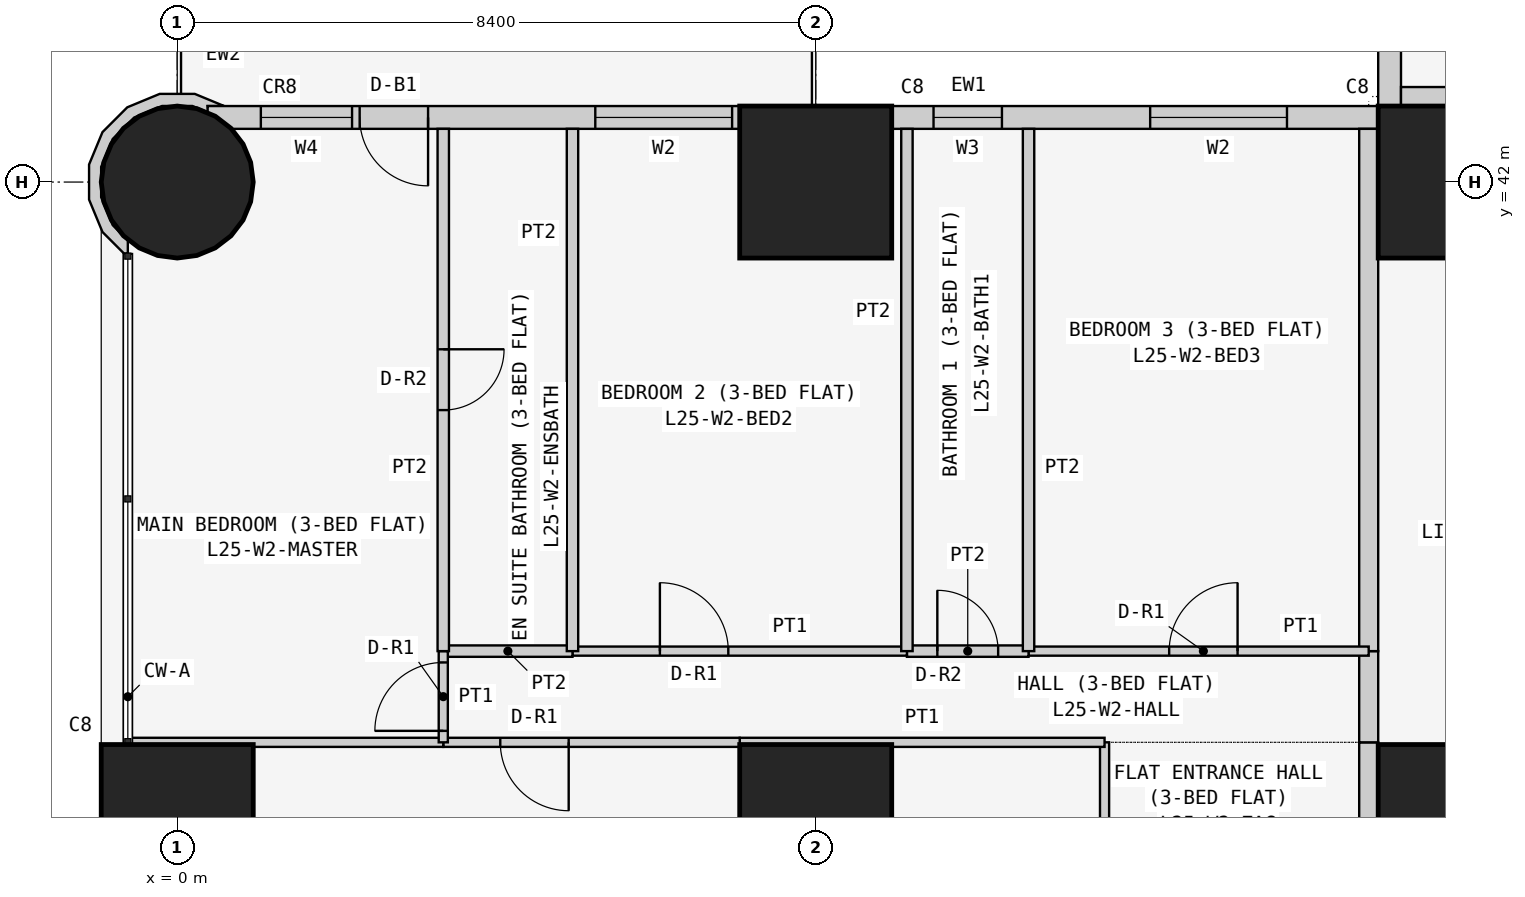
"""IFC4 building model, lengths in metres.
Left out: names, types, materials, properties, quantities, classifications, styles, units other than length and angle.
Written with IfcOpenShell. Run it as: python <this file> out.ifc"""

import sys

from ifc_helpers import new_model, si_unit, direction, frame, frame_2d, origin, origin_2d, place, context, subcontext, project, spatial, polyline, rectangle, circle, outline, extrude, element, fill, save


model = new_model("IFC4")
c1 = context("Model", 3, precision=1e-05, world=origin(), true_north=direction((0.0, 1.0)))
c2 = subcontext(c1, "Body", "Model", "MODEL_VIEW")
j1 = project(units=[si_unit("LENGTHUNIT", "METRE"), si_unit("PLANEANGLEUNIT", "RADIAN")], contexts=[c1])
p1 = place(None, origin())
s1 = spatial("IfcSite", under=j1, at=p1, CompositionType="ELEMENT")
p2 = place(p1, origin())
s2 = spatial("IfcBuilding", under=s1, at=p2, CompositionType="ELEMENT")
p3 = place(p2, frame((0.0, 0.0, 99.3)))
s3 = spatial("IfcBuildingStorey", under=s2, at=p3, CompositionType="ELEMENT", Elevation=99.3)
p4 = place(p3, frame((0.0, 33.6, 0.0), z_axis=(0.0, 0.0, 1.0), x_axis=(1.0, 0.0, 0.0)))
e1 = element("IfcColumn", 1, at=p4, inside=s3, PredefinedType="COLUMN", context=c2, shape_type="SweptSolid", body=[
    extrude(rectangle(XDim=2.0, YDim=2.0, at=origin_2d()), origin(), (0.0, 0.0, 1.0), 3.6),
])
p5 = place(p3, frame((0.0, 42.0, 0.0), z_axis=(0.0, 0.0, 1.0), x_axis=(1.0, 0.0, 0.0)))
e2 = element("IfcColumn", 2, at=p5, inside=s3, PredefinedType="COLUMN", context=c2, shape_type="SweptSolid", body=[
    extrude(circle(Radius=1.0, at=origin_2d()), origin(), (0.0, 0.0, 1.0), 3.6),
])
for number, where, z_axis, x_axis in (
    (3, (8.4, 33.6, 0.0), (0.0, 0.0, 1.0), (1.0, 0.0, 0.0)),
    (4, (8.4, 42.0, 0.0), (0.0, 0.0, 1.0), (1.0, 0.0, 0.0)),
    (5, (16.8, 33.6, 0.0), (0.0, 0.0, 1.0), (1.0, 0.0, 0.0)),
    (6, (16.8, 42.0, 0.0), (0.0, 0.0, 1.0), (1.0, 0.0, 0.0)),
):
    element("IfcColumn", number, at=place(p3, frame(where, z_axis=z_axis, x_axis=x_axis)), inside=s3, PredefinedType="COLUMN", context=c2, shape_type="SweptSolid", body=[
        extrude(rectangle(XDim=2.0, YDim=2.0, at=origin_2d()), origin(), (0.0, 0.0, 1.0), 3.6),
    ])
p6 = place(p3, frame((15.8, 42.85, 0.0), z_axis=(0.0, 0.0, 1.0), x_axis=(-1.0, 0.0, 0.0)))
e7 = element("IfcWall", 7, at=p6, inside=s3, PredefinedType="SOLIDWALL", context=c2, shape_type="SweptSolid", body=[
    extrude(rectangle(XDim=15.4, YDim=0.3, at=frame_2d((7.7, 0.0))), origin(), (0.0, 0.0, 1.0), 3.35),
])
p7 = place(p6, frame((1.2, 0.0, 0.9)))
e8 = element("IfcOpeningElement", 8, at=p7, cuts=e7, PredefinedType="OPENING", context=c2, shape_type="SweptSolid", body=[
    extrude(rectangle(XDim=1.8, YDim=1.5, at=frame_2d((0.9, 0.75))), frame((0.0, 0.16, 0.0), z_axis=(0.0, -1.0, 0.0), x_axis=(1.0, 0.0, 0.0)), (0.0, 0.0, 1.0), 0.32),
])
p8 = place(p6, frame((4.95, 0.0, 1.5)))
e9 = element("IfcOpeningElement", 9, at=p8, cuts=e7, PredefinedType="OPENING", context=c2, shape_type="SweptSolid", body=[
    extrude(rectangle(XDim=0.9, YDim=0.7, at=frame_2d((0.45, 0.35))), frame((0.0, 0.16, 0.0), z_axis=(0.0, -1.0, 0.0), x_axis=(1.0, 0.0, 0.0)), (0.0, 0.0, 1.0), 0.32),
])
p9 = place(p6, frame((8.5, 0.0, 0.9)))
e10 = element("IfcOpeningElement", 10, at=p9, cuts=e7, PredefinedType="OPENING", context=c2, shape_type="SweptSolid", body=[
    extrude(rectangle(XDim=1.8, YDim=1.5, at=frame_2d((0.9, 0.75))), frame((0.0, 0.16, 0.0), z_axis=(0.0, -1.0, 0.0), x_axis=(1.0, 0.0, 0.0)), (0.0, 0.0, 1.0), 0.32),
])
p10 = place(p6, frame((12.5, 0.0, 0.0)))
e11 = element("IfcOpeningElement", 11, at=p10, cuts=e7, PredefinedType="OPENING", context=c2, shape_type="SweptSolid", body=[
    extrude(rectangle(XDim=0.9, YDim=2.4, at=frame_2d((0.45, 1.2))), frame((0.0, 0.16, 0.0), z_axis=(0.0, -1.0, 0.0), x_axis=(1.0, 0.0, 0.0)), (0.0, 0.0, 1.0), 0.32),
])
p11 = place(p6, frame((13.5, 0.0, 0.9)))
e12 = element("IfcOpeningElement", 12, at=p11, cuts=e7, PredefinedType="OPENING", context=c2, shape_type="SweptSolid", body=[
    extrude(rectangle(XDim=1.2, YDim=1.5, at=frame_2d((0.6, 0.75))), frame((0.0, 0.16, 0.0), z_axis=(0.0, -1.0, 0.0), x_axis=(1.0, 0.0, 0.0)), (0.0, 0.0, 1.0), 0.32),
])
p12 = place(p3, frame((15.95, 58.4, 0.0), z_axis=(0.0, 0.0, 1.0), x_axis=(0.0, -1.0, 0.0)))
e13 = element("IfcWall", 13, at=p12, inside=s3, PredefinedType="SOLIDWALL", context=c2, shape_type="SweptSolid", body=[
    extrude(rectangle(XDim=15.7, YDim=0.3, at=frame_2d((7.85, 0.0))), origin(), (0.0, 0.0, 1.0), 3.35),
])
p13 = place(p12, frame((12.4, 0.0, 0.9)))
e14 = element("IfcOpeningElement", 14, at=p13, cuts=e13, PredefinedType="OPENING", context=c2, shape_type="SweptSolid", body=[
    extrude(rectangle(XDim=1.8, YDim=1.5, at=frame_2d((0.9, 0.75))), frame((0.0, 0.16, 0.0), z_axis=(0.0, -1.0, 0.0), x_axis=(1.0, 0.0, 0.0)), (0.0, 0.0, 1.0), 0.32),
])
p14 = place(p12, frame((9.55, 0.0, 1.5)))
e15 = element("IfcOpeningElement", 15, at=p14, cuts=e13, PredefinedType="OPENING", context=c2, shape_type="SweptSolid", body=[
    extrude(rectangle(XDim=0.9, YDim=0.7, at=frame_2d((0.45, 0.35))), frame((0.0, 0.16, 0.0), z_axis=(0.0, -1.0, 0.0), x_axis=(1.0, 0.0, 0.0)), (0.0, 0.0, 1.0), 0.32),
])
p15 = place(p12, frame((5.1, 0.0, 0.9)))
e16 = element("IfcOpeningElement", 16, at=p15, cuts=e13, PredefinedType="OPENING", context=c2, shape_type="SweptSolid", body=[
    extrude(rectangle(XDim=1.8, YDim=1.5, at=frame_2d((0.9, 0.75))), frame((0.0, 0.16, 0.0), z_axis=(0.0, -1.0, 0.0), x_axis=(1.0, 0.0, 0.0)), (0.0, 0.0, 1.0), 0.32),
])
p16 = place(p12, frame((2.0, 0.0, 0.0)))
e17 = element("IfcOpeningElement", 17, at=p16, cuts=e13, PredefinedType="OPENING", context=c2, shape_type="SweptSolid", body=[
    extrude(rectangle(XDim=0.9, YDim=2.4, at=frame_2d((0.45, 1.2))), frame((0.0, 0.16, 0.0), z_axis=(0.0, -1.0, 0.0), x_axis=(1.0, 0.0, 0.0)), (0.0, 0.0, 1.0), 0.32),
])
p17 = place(p12, frame((0.7, 0.0, 0.9)))
e18 = element("IfcOpeningElement", 18, at=p17, cuts=e13, PredefinedType="OPENING", context=c2, shape_type="SweptSolid", body=[
    extrude(rectangle(XDim=1.2, YDim=1.5, at=frame_2d((0.6, 0.75))), frame((0.0, 0.16, 0.0), z_axis=(0.0, -1.0, 0.0), x_axis=(1.0, 0.0, 0.0)), (0.0, 0.0, 1.0), 0.32),
])
p18 = place(p3, frame((0.567, 42.919, 0.0), z_axis=(0.0, 0.0, 1.0), x_axis=(-0.831199417842, 0.555974394895, 0.0)))
e19 = element("IfcWall", 19, at=p18, inside=s3, PredefinedType="SOLIDWALL", context=c2, shape_type="SweptSolid", body=[
    extrude(outline(polyline([(0.004, -0.095), (0.413, -0.013), (0.797, 0.243), (1.053, 0.627), (1.143, 1.08), (1.053, 1.532), (0.796, 1.916), (0.412, 2.172), (0.017, 2.251), (-0.023, 2.224), (0.075, 2.077), (0.351, 2.022), (0.682, 1.801), (0.903, 1.47), (0.981, 1.08), (0.903, 0.689), (0.682, 0.358), (0.351, 0.137), (0.126, 0.092), (0.184, 0.026), (0.004, -0.095)])), origin(), (0.0, 0.0, 1.0), 3.35),
])
p19 = place(p3, frame((16.1, 43.125, 0.0), z_axis=(0.0, 0.0, 1.0), x_axis=(1.0, 0.0, 0.0)))
e20 = element("IfcWall", 20, at=p19, inside=s3, PredefinedType="PARTITIONING", context=c2, shape_type="SweptSolid", body=[
    extrude(rectangle(XDim=6.871, YDim=0.25, at=frame_2d((3.436, 0.0))), origin(), (0.0, 0.0, 1.0), 3.35),
])
p20 = place(p3, frame((15.675, 29.4, 0.0), z_axis=(0.0, 0.0, 1.0), x_axis=(0.0, 1.0, 0.0)))
e21 = element("IfcWall", 21, at=p20, inside=s3, PredefinedType="PARTITIONING", context=c2, shape_type="SweptSolid", body=[
    extrude(rectangle(XDim=5.229, YDim=0.25, at=frame_2d((2.615, 0.0))), origin(), (0.0, 0.0, 1.0), 3.35),
])
p21 = place(p20, frame((2.0, 0.0, 0.0)))
e22 = element("IfcOpeningElement", 22, at=p21, cuts=e21, PredefinedType="OPENING", context=c2, shape_type="SweptSolid", body=[
    extrude(rectangle(XDim=1.0, YDim=2.1, at=frame_2d((0.5, 1.05))), frame((0.0, 0.135, 0.0), z_axis=(0.0, -1.0, 0.0), x_axis=(1.0, 0.0, 0.0)), (0.0, 0.0, 1.0), 0.27),
])
p22 = place(p3, frame((15.675, 34.629, 0.0), z_axis=(0.0, 0.0, 1.0), x_axis=(0.0, 1.0, 0.0)))
e23 = element("IfcWall", 23, at=p22, inside=s3, PredefinedType="PARTITIONING", context=c2, shape_type="SweptSolid", body=[
    extrude(rectangle(XDim=1.2, YDim=0.25, at=frame_2d((0.6, 0.0))), origin(), (0.0, 0.0, 1.0), 3.35),
])
p23 = place(p3, frame((15.675, 35.829, 0.0), z_axis=(0.0, 0.0, 1.0), x_axis=(0.0, 1.0, 0.0)))
e24 = element("IfcWall", 24, at=p23, inside=s3, PredefinedType="PARTITIONING", context=c2, shape_type="SweptSolid", body=[
    extrude(rectangle(XDim=6.871, YDim=0.25, at=frame_2d((3.436, 0.0))), origin(), (0.0, 0.0, 1.0), 3.35),
])
p24 = place(p3, frame((12.2, 29.4, 0.0), z_axis=(0.0, 0.0, 1.0), x_axis=(0.0, 1.0, 0.0)))
e25 = element("IfcWall", 25, at=p24, inside=s3, PredefinedType="PARTITIONING", context=c2, shape_type="SweptSolid", body=[
    extrude(rectangle(XDim=5.229, YDim=0.12, at=frame_2d((2.615, 0.0))), origin(), (0.0, 0.0, 1.0), 3.35),
])
p25 = place(p24, frame((1.05, 0.0, 0.0)))
e26 = element("IfcOpeningElement", 26, at=p25, cuts=e25, PredefinedType="OPENING", context=c2, shape_type="SweptSolid", body=[
    extrude(rectangle(XDim=0.9, YDim=2.1, at=frame_2d((0.45, 1.05))), frame((0.0, 0.07, 0.0), z_axis=(0.0, -1.0, 0.0), x_axis=(1.0, 0.0, 0.0)), (0.0, 0.0, 1.0), 0.14),
])
p26 = place(p3, frame((7.4, 34.629, 0.0), z_axis=(0.0, 0.0, 1.0), x_axis=(1.0, 0.0, 0.0)))
e27 = element("IfcWall", 27, at=p26, inside=s3, PredefinedType="PARTITIONING", context=c2, shape_type="SweptSolid", body=[
    extrude(rectangle(XDim=4.8, YDim=0.12, at=frame_2d((2.4, 0.0))), origin(), (0.0, 0.0, 1.0), 3.35),
])
p27 = place(p3, frame((3.5, 34.629, 0.0), z_axis=(0.0, 0.0, 1.0), x_axis=(1.0, 0.0, 0.0)))
e28 = element("IfcWall", 28, at=p27, inside=s3, PredefinedType="PARTITIONING", context=c2, shape_type="SweptSolid", body=[
    extrude(rectangle(XDim=3.9, YDim=0.12, at=frame_2d((1.95, 0.0))), origin(), (0.0, 0.0, 1.0), 3.35),
])
p28 = place(p27, frame((0.75, 0.0, 0.0)))
e29 = element("IfcOpeningElement", 29, at=p28, cuts=e28, PredefinedType="OPENING", context=c2, shape_type="SweptSolid", body=[
    extrude(rectangle(XDim=0.9, YDim=2.1, at=frame_2d((0.45, 1.05))), frame((0.0, 0.07, 0.0), z_axis=(0.0, -1.0, 0.0), x_axis=(1.0, 0.0, 0.0)), (0.0, 0.0, 1.0), 0.14),
])
p29 = place(p3, frame((-0.65, 34.629, 0.0), z_axis=(0.0, 0.0, 1.0), x_axis=(1.0, 0.0, 0.0)))
e30 = element("IfcWall", 30, at=p29, inside=s3, PredefinedType="PARTITIONING", context=c2, shape_type="SweptSolid", body=[
    extrude(rectangle(XDim=4.15, YDim=0.12, at=frame_2d((2.075, 0.0))), origin(), (0.0, 0.0, 1.0), 3.35),
])
p30 = place(p3, frame((11.2, 35.829, 0.0), z_axis=(0.0, 0.0, 1.0), x_axis=(1.0, 0.0, 0.0)))
e31 = element("IfcWall", 31, at=p30, inside=s3, PredefinedType="PARTITIONING", context=c2, shape_type="SweptSolid", body=[
    extrude(rectangle(XDim=4.475, YDim=0.12, at=frame_2d((2.238, 0.0))), origin(), (0.0, 0.0, 1.0), 3.35),
])
p31 = place(p30, frame((1.85, 0.0, 0.0)))
e32 = element("IfcOpeningElement", 32, at=p31, cuts=e31, PredefinedType="OPENING", context=c2, shape_type="SweptSolid", body=[
    extrude(rectangle(XDim=0.9, YDim=2.1, at=frame_2d((0.45, 1.05))), frame((0.0, 0.07, 0.0), z_axis=(0.0, -1.0, 0.0), x_axis=(1.0, 0.0, 0.0)), (0.0, 0.0, 1.0), 0.14),
])
p32 = place(p3, frame((9.6, 35.829, 0.0), z_axis=(0.0, 0.0, 1.0), x_axis=(1.0, 0.0, 0.0)))
e33 = element("IfcWall", 33, at=p32, inside=s3, PredefinedType="PARTITIONING", context=c2, shape_type="SweptSolid", body=[
    extrude(rectangle(XDim=1.6, YDim=0.15, at=frame_2d((0.8, 0.0))), origin(), (0.0, 0.0, 1.0), 3.35),
])
p33 = place(p32, frame((0.4, 0.0, 0.0)))
e34 = element("IfcOpeningElement", 34, at=p33, cuts=e33, PredefinedType="OPENING", context=c2, shape_type="SweptSolid", body=[
    extrude(rectangle(XDim=0.8, YDim=2.1, at=frame_2d((0.4, 1.05))), frame((0.0, 0.085, 0.0), z_axis=(0.0, -1.0, 0.0), x_axis=(1.0, 0.0, 0.0)), (0.0, 0.0, 1.0), 0.17),
])
p34 = place(p3, frame((5.2, 35.829, 0.0), z_axis=(0.0, 0.0, 1.0), x_axis=(1.0, 0.0, 0.0)))
e35 = element("IfcWall", 35, at=p34, inside=s3, PredefinedType="PARTITIONING", context=c2, shape_type="SweptSolid", body=[
    extrude(rectangle(XDim=4.4, YDim=0.12, at=frame_2d((2.2, 0.0))), origin(), (0.0, 0.0, 1.0), 3.35),
])
p35 = place(p34, frame((1.15, 0.0, 0.0)))
e36 = element("IfcOpeningElement", 36, at=p35, cuts=e35, PredefinedType="OPENING", context=c2, shape_type="SweptSolid", body=[
    extrude(rectangle(XDim=0.9, YDim=2.1, at=frame_2d((0.45, 1.05))), frame((0.0, 0.07, 0.0), z_axis=(0.0, -1.0, 0.0), x_axis=(1.0, 0.0, 0.0)), (0.0, 0.0, 1.0), 0.14),
])
p36 = place(p3, frame((3.5, 35.829, 0.0), z_axis=(0.0, 0.0, 1.0), x_axis=(1.0, 0.0, 0.0)))
e37 = element("IfcWall", 37, at=p36, inside=s3, PredefinedType="PARTITIONING", context=c2, shape_type="SweptSolid", body=[
    extrude(rectangle(XDim=1.7, YDim=0.15, at=frame_2d((0.85, 0.0))), origin(), (0.0, 0.0, 1.0), 3.35),
])
p37 = place(p3, frame((3.5, 34.629, 0.0), z_axis=(0.0, 0.0, 1.0), x_axis=(0.0, 1.0, 0.0)))
e38 = element("IfcWall", 38, at=p37, inside=s3, PredefinedType="PARTITIONING", context=c2, shape_type="SweptSolid", body=[
    extrude(rectangle(XDim=1.2, YDim=0.12, at=frame_2d((0.6, 0.0))), origin(), (0.0, 0.0, 1.0), 3.35),
])
p38 = place(p37, frame((0.151, 0.0, 0.0)))
e39 = element("IfcOpeningElement", 39, at=p38, cuts=e38, PredefinedType="OPENING", context=c2, shape_type="SweptSolid", body=[
    extrude(rectangle(XDim=0.9, YDim=2.1, at=frame_2d((0.45, 1.05))), frame((0.0, 0.07, 0.0), z_axis=(0.0, -1.0, 0.0), x_axis=(1.0, 0.0, 0.0)), (0.0, 0.0, 1.0), 0.14),
])
for number, where, z_axis, x_axis in (
    (40, (11.2, 35.829, 0.0), (0.0, 0.0, 1.0), (0.0, 1.0, 0.0)),
    (41, (9.6, 35.829, 0.0), (0.0, 0.0, 1.0), (0.0, 1.0, 0.0)),
    (42, (5.2, 35.829, 0.0), (0.0, 0.0, 1.0), (0.0, 1.0, 0.0)),
):
    element("IfcWall", number, at=place(p3, frame(where, z_axis=z_axis, x_axis=x_axis)), inside=s3, PredefinedType="PARTITIONING", context=c2, shape_type="SweptSolid", body=[
        extrude(rectangle(XDim=6.871, YDim=0.15, at=frame_2d((3.436, 0.0))), origin(), (0.0, 0.0, 1.0), 3.35),
    ])
p39 = place(p3, frame((3.5, 35.829, 0.0), z_axis=(0.0, 0.0, 1.0), x_axis=(0.0, 1.0, 0.0)))
e43 = element("IfcWall", 43, at=p39, inside=s3, PredefinedType="PARTITIONING", context=c2, shape_type="SweptSolid", body=[
    extrude(rectangle(XDim=6.871, YDim=0.15, at=frame_2d((3.436, 0.0))), origin(), (0.0, 0.0, 1.0), 3.35),
])
p40 = place(p39, frame((3.171, 0.0, 0.0)))
e44 = element("IfcOpeningElement", 44, at=p40, cuts=e43, PredefinedType="OPENING", context=c2, shape_type="SweptSolid", body=[
    extrude(rectangle(XDim=0.8, YDim=2.1, at=frame_2d((0.4, 1.05))), frame((0.0, 0.085, 0.0), z_axis=(0.0, -1.0, 0.0), x_axis=(1.0, 0.0, 0.0)), (0.0, 0.0, 1.0), 0.17),
])
p41 = place(p7, origin())
e45 = element("IfcWindow", 45, at=p41, inside=s3, PartitioningType="SINGLE_PANEL", PredefinedType="WINDOW", context=c2, shape_type="SweptSolid", body=[
    extrude(rectangle(XDim=1.8, YDim=1.5, at=frame_2d((0.9, 0.75))), frame((0.0, 0.03, 0.0), z_axis=(0.0, -1.0, 0.0), x_axis=(1.0, 0.0, 0.0)), (0.0, 0.0, 1.0), 0.06),
])
fill(e8, e45)
p42 = place(p8, origin())
e46 = element("IfcWindow", 46, at=p42, inside=s3, PartitioningType="SINGLE_PANEL", PredefinedType="WINDOW", context=c2, shape_type="SweptSolid", body=[
    extrude(rectangle(XDim=0.9, YDim=0.7, at=frame_2d((0.45, 0.35))), frame((0.0, 0.03, 0.0), z_axis=(0.0, -1.0, 0.0), x_axis=(1.0, 0.0, 0.0)), (0.0, 0.0, 1.0), 0.06),
])
fill(e9, e46)
p43 = place(p9, origin())
e47 = element("IfcWindow", 47, at=p43, inside=s3, PartitioningType="SINGLE_PANEL", PredefinedType="WINDOW", context=c2, shape_type="SweptSolid", body=[
    extrude(rectangle(XDim=1.8, YDim=1.5, at=frame_2d((0.9, 0.75))), frame((0.0, 0.03, 0.0), z_axis=(0.0, -1.0, 0.0), x_axis=(1.0, 0.0, 0.0)), (0.0, 0.0, 1.0), 0.06),
])
fill(e10, e47)
p44 = place(p10, origin())
e48 = element("IfcDoor", 48, at=p44, inside=s3, OperationType="SINGLE_SWING_LEFT", PredefinedType="DOOR", context=c2, shape_type="SweptSolid", body=[
    extrude(rectangle(XDim=0.9, YDim=2.4, at=frame_2d((0.45, 1.2))), frame((0.0, 0.025, 0.0), z_axis=(0.0, -1.0, 0.0), x_axis=(1.0, 0.0, 0.0)), (0.0, 0.0, 1.0), 0.05),
])
fill(e11, e48)
p45 = place(p11, origin())
e49 = element("IfcWindow", 49, at=p45, inside=s3, PartitioningType="SINGLE_PANEL", PredefinedType="WINDOW", context=c2, shape_type="SweptSolid", body=[
    extrude(rectangle(XDim=1.2, YDim=1.5, at=frame_2d((0.6, 0.75))), frame((0.0, 0.03, 0.0), z_axis=(0.0, -1.0, 0.0), x_axis=(1.0, 0.0, 0.0)), (0.0, 0.0, 1.0), 0.06),
])
fill(e12, e49)
p46 = place(p28, frame((0.9, 0.0, 0.0), z_axis=(0.0, 0.0, 1.0), x_axis=(-1.0, 0.0, 0.0)))
e50 = element("IfcDoor", 50, at=p46, inside=s3, OperationType="SINGLE_SWING_LEFT", PredefinedType="DOOR", context=c2, shape_type="SweptSolid", body=[
    extrude(rectangle(XDim=0.9, YDim=2.1, at=frame_2d((0.45, 1.05))), frame((0.0, 0.025, 0.0), z_axis=(0.0, -1.0, 0.0), x_axis=(1.0, 0.0, 0.0)), (0.0, 0.0, 1.0), 0.05),
])
fill(e29, e50)
p47 = place(p31, origin())
e51 = element("IfcDoor", 51, at=p47, inside=s3, OperationType="SINGLE_SWING_RIGHT", PredefinedType="DOOR", context=c2, shape_type="SweptSolid", body=[
    extrude(rectangle(XDim=0.9, YDim=2.1, at=frame_2d((0.45, 1.05))), frame((0.0, 0.025, 0.0), z_axis=(0.0, -1.0, 0.0), x_axis=(1.0, 0.0, 0.0)), (0.0, 0.0, 1.0), 0.05),
])
fill(e32, e51)
p48 = place(p33, origin())
e52 = element("IfcDoor", 52, at=p48, inside=s3, OperationType="SINGLE_SWING_LEFT", PredefinedType="DOOR", context=c2, shape_type="SweptSolid", body=[
    extrude(rectangle(XDim=0.8, YDim=2.1, at=frame_2d((0.4, 1.05))), frame((0.0, 0.025, 0.0), z_axis=(0.0, -1.0, 0.0), x_axis=(1.0, 0.0, 0.0)), (0.0, 0.0, 1.0), 0.05),
])
fill(e34, e52)
p49 = place(p35, origin())
e53 = element("IfcDoor", 53, at=p49, inside=s3, OperationType="SINGLE_SWING_LEFT", PredefinedType="DOOR", context=c2, shape_type="SweptSolid", body=[
    extrude(rectangle(XDim=0.9, YDim=2.1, at=frame_2d((0.45, 1.05))), frame((0.0, 0.025, 0.0), z_axis=(0.0, -1.0, 0.0), x_axis=(1.0, 0.0, 0.0)), (0.0, 0.0, 1.0), 0.05),
])
fill(e36, e53)
p50 = place(p38, origin())
e54 = element("IfcDoor", 54, at=p50, inside=s3, OperationType="SINGLE_SWING_LEFT", PredefinedType="DOOR", context=c2, shape_type="SweptSolid", body=[
    extrude(rectangle(XDim=0.9, YDim=2.1, at=frame_2d((0.45, 1.05))), frame((0.0, 0.025, 0.0), z_axis=(0.0, -1.0, 0.0), x_axis=(1.0, 0.0, 0.0)), (0.0, 0.0, 1.0), 0.05),
])
fill(e39, e54)
p51 = place(p40, frame((0.8, 0.0, 0.0), z_axis=(0.0, 0.0, 1.0), x_axis=(-1.0, 0.0, 0.0)))
e55 = element("IfcDoor", 55, at=p51, inside=s3, OperationType="SINGLE_SWING_LEFT", PredefinedType="DOOR", context=c2, shape_type="SweptSolid", body=[
    extrude(rectangle(XDim=0.8, YDim=2.1, at=frame_2d((0.4, 1.05))), frame((0.0, 0.025, 0.0), z_axis=(0.0, -1.0, 0.0), x_axis=(1.0, 0.0, 0.0)), (0.0, 0.0, 1.0), 0.05),
])
fill(e44, e55)
save(model, sys.argv[1])
